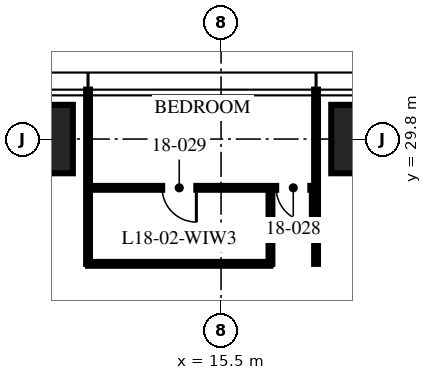
"""IFC4 building model, lengths in metres.
Left out: names, types, materials, properties, quantities, classifications, styles, units other than length and angle.
Written with IfcOpenShell. Run it as: python <this file> out.ifc"""

import sys

from ifc_helpers import new_model, si_unit, direction, frame, frame_2d, origin, origin_2d, place, context, subcontext, project, spatial, rectangle, hollow_rectangle, extrude, element, fill, save


model = new_model("IFC4")
c1 = context("Model", 3, precision=1e-05, world=origin(), true_north=direction((0.0, 1.0)))
c2 = subcontext(c1, "Body", "Model", "MODEL_VIEW")
j1 = project(units=[si_unit("LENGTHUNIT", "METRE"), si_unit("PLANEANGLEUNIT", "RADIAN")], contexts=[c1])
p1 = place(None, origin())
s1 = spatial("IfcSite", under=j1, at=p1, CompositionType="ELEMENT")
p2 = place(p1, origin())
s2 = spatial("IfcBuilding", under=s1, at=p2, CompositionType="ELEMENT")
p3 = place(p2, frame((0.0, 0.0, 73.5)))
s3 = spatial("IfcBuildingStorey", under=s2, at=p3, CompositionType="ELEMENT", Elevation=73.5)
for number, where, z_axis, x_axis in (
    (1, (10.0, 29.8, 0.0), (0.0, 0.0, 1.0), (1.0, 0.0, 0.0)),
    (2, (20.0, 29.8, 0.0), (0.0, 0.0, 1.0), (1.0, 0.0, 0.0)),
):
    element("IfcColumn", number, at=place(p3, frame(where, z_axis=z_axis, x_axis=x_axis)), inside=s3, PredefinedType="COLUMN", context=c2, shape_type="SweptSolid", body=[
        extrude(hollow_rectangle(XDim=3.2, YDim=1.8, WallThickness=0.2, at=origin_2d()), origin(), (0.0, 0.0, 1.0), 3.75),
    ])
for number, where, z_axis, x_axis in (
    (3, (18.0, 26.517, 0.0), (0.0, 0.0, 1.0), (0.0, 1.0, 0.0)),
    (4, (12.0, 26.517, 0.0), (0.0, 0.0, 1.0), (0.0, 1.0, 0.0)),
):
    element("IfcWall", number, at=place(p3, frame(where, z_axis=z_axis, x_axis=x_axis)), inside=s3, PredefinedType="PARTITIONING", context=c2, shape_type="SweptSolid", body=[
        extrude(rectangle(XDim=4.583, YDim=0.1, at=frame_2d((2.292, 0.0))), origin(), (0.0, 0.0, 1.0), 2.71),
    ])
p4 = place(p3, frame((18.0, 28.517, 0.0), z_axis=(0.0, 0.0, 1.0), x_axis=(-1.0, 0.0, 0.0)))
e5 = element("IfcWall", 5, at=p4, inside=s3, PredefinedType="PARTITIONING", context=c2, shape_type="SweptSolid", body=[
    extrude(rectangle(XDim=6.0, YDim=0.1, at=frame_2d((3.0, 0.0))), origin(), (0.0, 0.0, 1.0), 2.61),
])
p5 = place(p4, frame((0.15, 0.0, 0.0)))
e6 = element("IfcOpeningElement", 6, at=p5, cuts=e5, PredefinedType="OPENING", context=c2, shape_type="SweptSolid", body=[
    extrude(rectangle(XDim=0.9, YDim=2.1, at=frame_2d((0.45, 1.05))), frame((0.0, 0.06, 0.0), z_axis=(0.0, -1.0, 0.0), x_axis=(1.0, 0.0, 0.0)), (0.0, 0.0, 1.0), 0.12),
])
p6 = place(p4, frame((3.15, 0.0, 0.0)))
e7 = element("IfcOpeningElement", 7, at=p6, cuts=e5, PredefinedType="OPENING", context=c2, shape_type="SweptSolid", body=[
    extrude(rectangle(XDim=0.9, YDim=2.1, at=frame_2d((0.45, 1.05))), frame((0.0, 0.06, 0.0), z_axis=(0.0, -1.0, 0.0), x_axis=(1.0, 0.0, 0.0)), (0.0, 0.0, 1.0), 0.12),
])
p7 = place(p3, frame((16.8, 26.517, 0.0), z_axis=(0.0, 0.0, 1.0), x_axis=(0.0, 1.0, 0.0)))
e8 = element("IfcWall", 8, at=p7, inside=s3, PredefinedType="PARTITIONING", context=c2, shape_type="SweptSolid", body=[
    extrude(rectangle(XDim=2.0, YDim=0.1, at=frame_2d((1.0, 0.0))), origin(), (0.0, 0.0, 1.0), 3.5),
])
p8 = place(p3, frame((16.8, 26.517, 0.0), z_axis=(0.0, 0.0, 1.0), x_axis=(-1.0, 0.0, 0.0)))
e9 = element("IfcWall", 9, at=p8, inside=s3, PredefinedType="PARTITIONING", context=c2, shape_type="SweptSolid", body=[
    extrude(rectangle(XDim=4.8, YDim=0.1, at=frame_2d((2.4, 0.0))), origin(), (0.0, 0.0, 1.0), 2.61),
])
p9 = place(p5, origin())
e10 = element("IfcDoor", 10, at=p9, inside=s3, OperationType="SINGLE_SWING_LEFT", PredefinedType="DOOR", context=c2, shape_type="SweptSolid", body=[
    extrude(rectangle(XDim=0.9, YDim=2.1, at=frame_2d((0.45, 1.05))), frame((0.0, 0.025, 0.0), z_axis=(0.0, -1.0, 0.0), x_axis=(1.0, 0.0, 0.0)), (0.0, 0.0, 1.0), 0.05),
])
fill(e6, e10)
p10 = place(p6, origin())
e11 = element("IfcDoor", 11, at=p10, inside=s3, OperationType="SINGLE_SWING_LEFT", PredefinedType="DOOR", context=c2, shape_type="SweptSolid", body=[
    extrude(rectangle(XDim=0.9, YDim=2.1, at=frame_2d((0.45, 1.05))), frame((0.0, 0.025, 0.0), z_axis=(0.0, -1.0, 0.0), x_axis=(1.0, 0.0, 0.0)), (0.0, 0.0, 1.0), 0.05),
])
fill(e7, e11)
save(model, sys.argv[1])
